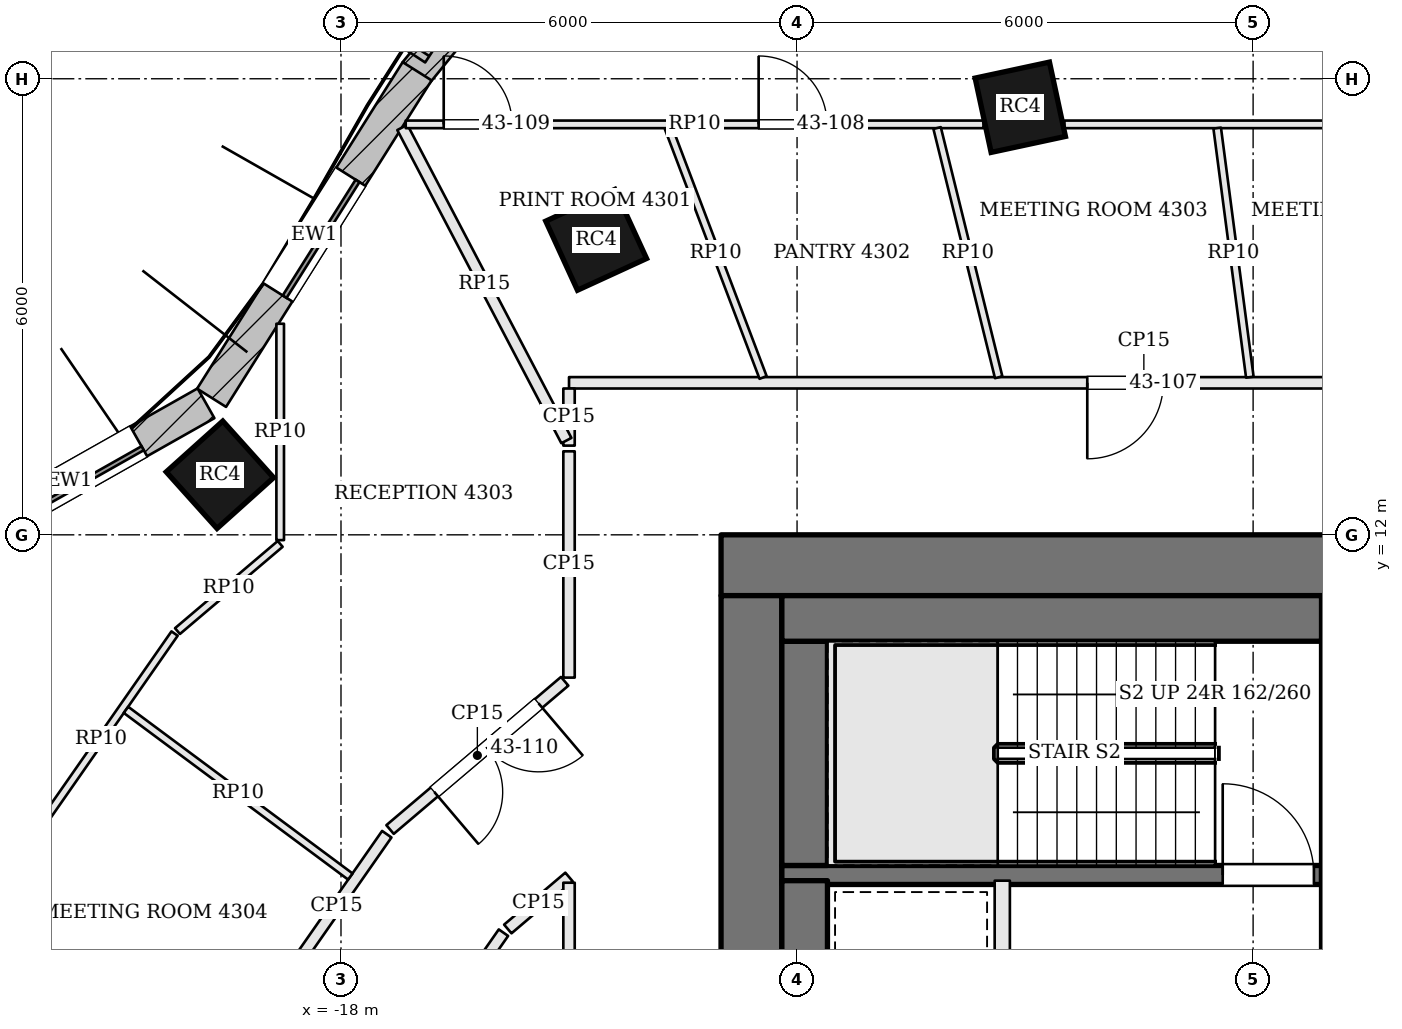
"""IFC4 building model, lengths in metres.
Left out: names, types, materials, properties, quantities, classifications, styles, units other than length and angle.
Written with IfcOpenShell. Run it as: python <this file> out.ifc"""

import sys

from ifc_helpers import new_model, si_unit, direction, frame, frame_2d, origin, origin_2d, place, context, subcontext, project, spatial, rectangle, extrude, element, fill, save


model = new_model("IFC4")
c1 = context("Model", 3, precision=1e-05, world=origin(), true_north=direction((0.0, 1.0)))
c2 = subcontext(c1, "Body", "Model", "MODEL_VIEW")
j1 = project(units=[si_unit("LENGTHUNIT", "METRE"), si_unit("PLANEANGLEUNIT", "RADIAN")], contexts=[c1])
p1 = place(None, origin())
s1 = spatial("IfcSite", under=j1, at=p1, CompositionType="ELEMENT")
p2 = place(p1, origin())
s2 = spatial("IfcBuilding", under=s1, at=p2, CompositionType="ELEMENT")
p3 = place(p2, frame((0.0, 0.0, 177.9)))
s3 = spatial("IfcBuildingStorey", under=s2, at=p3, CompositionType="ELEMENT", Elevation=177.9)
p4 = place(p3, frame((-13.0, 11.6, 0.0), z_axis=(0.0, 0.0, 1.0), x_axis=(1.0, 0.0, 0.0)))
e1 = element("IfcWall", 1, at=p4, inside=s3, PredefinedType="SHEAR", context=c2, shape_type="SweptSolid", body=[
    extrude(rectangle(XDim=26.0, YDim=0.8, at=frame_2d((13.0, 0.0))), origin(), (0.0, 0.0, 1.0), 3.9),
])
p5 = place(p4, frame((9.375, 0.0, 0.0)))
e2 = element("IfcOpeningElement", 2, at=p5, cuts=e1, PredefinedType="OPENING", context=c2, shape_type="SweptSolid", body=[
    extrude(rectangle(XDim=0.7, YDim=2.1, at=frame_2d((0.35, 1.05))), frame((0.0, 0.41, 0.0), z_axis=(0.0, -1.0, 0.0), x_axis=(1.0, 0.0, 0.0)), (0.0, 0.0, 1.0), 0.82),
])
p6 = place(p4, frame((12.075, 0.0, 0.0)))
e3 = element("IfcOpeningElement", 3, at=p6, cuts=e1, PredefinedType="OPENING", context=c2, shape_type="SweptSolid", body=[
    extrude(rectangle(XDim=1.0, YDim=2.1, at=frame_2d((0.5, 1.05))), frame((0.0, 0.41, 0.0), z_axis=(0.0, -1.0, 0.0), x_axis=(1.0, 0.0, 0.0)), (0.0, 0.0, 1.0), 0.82),
])
p7 = place(p4, frame((14.675, 0.0, 0.0)))
e4 = element("IfcOpeningElement", 4, at=p7, cuts=e1, PredefinedType="OPENING", context=c2, shape_type="SweptSolid", body=[
    extrude(rectangle(XDim=0.7, YDim=2.1, at=frame_2d((0.35, 1.05))), frame((0.0, 0.41, 0.0), z_axis=(0.0, -1.0, 0.0), x_axis=(1.0, 0.0, 0.0)), (0.0, 0.0, 1.0), 0.82),
])
p8 = place(p4, frame((16.625, 0.0, 0.0)))
e5 = element("IfcOpeningElement", 5, at=p8, cuts=e1, PredefinedType="OPENING", context=c2, shape_type="SweptSolid", body=[
    extrude(rectangle(XDim=0.9, YDim=2.1, at=frame_2d((0.45, 1.05))), frame((0.0, 0.41, 0.0), z_axis=(0.0, -1.0, 0.0), x_axis=(1.0, 0.0, 0.0)), (0.0, 0.0, 1.0), 0.82),
])
p9 = place(p3, frame((-12.6, -2.2, 0.0), z_axis=(0.0, 0.0, 1.0), x_axis=(0.0, 1.0, 0.0)))
e6 = element("IfcWall", 6, at=p9, inside=s3, PredefinedType="SHEAR", context=c2, shape_type="SweptSolid", body=[
    extrude(rectangle(XDim=13.4, YDim=0.8, at=frame_2d((6.7, 0.0))), origin(), (0.0, 0.0, 1.0), 3.9),
])
p10 = place(p9, frame((4.2, 0.0, 0.0)))
e7 = element("IfcOpeningElement", 7, at=p10, cuts=e6, PredefinedType="OPENING", context=c2, shape_type="SweptSolid", body=[
    extrude(rectangle(XDim=1.8, YDim=2.1, at=frame_2d((0.9, 1.05))), frame((0.0, 0.41, 0.0), z_axis=(0.0, -1.0, 0.0), x_axis=(1.0, 0.0, 0.0)), (0.0, 0.0, 1.0), 0.82),
])
for number, where, z_axis, x_axis in (
    (8, (-9.063, 17.625, 0.0), (0.0, 0.0, 1.0), (-0.978, -0.21, 0.0)),
    (9, (-14.643, 15.881, 0.0), (0.0, 0.0, 1.0), (-0.909, -0.417, 0.0)),
    (10, (-19.593, 12.79, 0.0), (0.0, 0.0, 1.0), (-0.744, -0.668, 0.0)),
):
    element("IfcColumn", number, at=place(p3, frame(where, z_axis=z_axis, x_axis=x_axis)), inside=s3, PredefinedType="COLUMN", context=c2, shape_type="SweptSolid", body=[
        extrude(rectangle(XDim=1.0, YDim=1.0, at=origin_2d()), origin(), (0.0, 0.0, 1.0), 3.9),
    ])
p11 = place(p3, frame((-14.926, 20.641, 0.0), z_axis=(0.0, 0.0, 1.0), x_axis=(-0.631548074669, -0.775336720001, 0.0)))
e11 = element("IfcWall", 11, at=p11, inside=s3, PredefinedType="SOLIDWALL", context=c2, shape_type="SweptSolid", body=[
    extrude(rectangle(XDim=3.308, YDim=0.45, at=frame_2d((1.654, 0.0))), origin(), (0.0, 0.0, 1.0), 3.7),
])
p12 = place(p11, frame((0.604, 0.0, 0.9)))
e12 = element("IfcOpeningElement", 12, at=p12, cuts=e11, PredefinedType="OPENING", context=c2, shape_type="SweptSolid", body=[
    extrude(rectangle(XDim=2.1, YDim=2.3, at=frame_2d((1.05, 1.15))), frame((0.0, 0.235, 0.0), z_axis=(0.0, -1.0, 0.0), x_axis=(1.0, 0.0, 0.0)), (0.0, 0.0, 1.0), 0.47),
])
p13 = place(p3, frame((-16.998, 18.099, 0.0), z_axis=(0.0, 0.0, 1.0), x_axis=(-0.532745661304, -0.846275404559, 0.0)))
e13 = element("IfcWall", 13, at=p13, inside=s3, PredefinedType="SOLIDWALL", context=c2, shape_type="SweptSolid", body=[
    extrude(rectangle(XDim=5.076, YDim=0.45, at=frame_2d((2.538, 0.0))), origin(), (0.0, 0.0, 1.0), 3.7),
])
p14 = place(p13, frame((1.638, 0.0, 0.9)))
e14 = element("IfcOpeningElement", 14, at=p14, cuts=e13, PredefinedType="OPENING", context=c2, shape_type="SweptSolid", body=[
    extrude(rectangle(XDim=1.8, YDim=2.3, at=frame_2d((0.9, 1.15))), frame((0.0, 0.235, 0.0), z_axis=(0.0, -1.0, 0.0), x_axis=(1.0, 0.0, 0.0)), (0.0, 0.0, 1.0), 0.47),
])
p15 = place(p3, frame((-19.776, 13.731, 0.0), z_axis=(0.0, 0.0, 1.0), x_axis=(-0.870610133829, -0.491973571318, 0.0)))
e15 = element("IfcWall", 15, at=p15, inside=s3, PredefinedType="SOLIDWALL", context=c2, shape_type="SweptSolid", body=[
    extrude(rectangle(XDim=4.134, YDim=0.45, at=frame_2d((2.067, 0.0))), origin(), (0.0, 0.0, 1.0), 3.7),
])
p16 = place(p15, frame((1.017, 0.0, 0.9)))
e16 = element("IfcOpeningElement", 16, at=p16, cuts=e15, PredefinedType="OPENING", context=c2, shape_type="SweptSolid", body=[
    extrude(rectangle(XDim=2.1, YDim=2.3, at=frame_2d((1.05, 1.15))), frame((0.0, 0.235, 0.0), z_axis=(0.0, -1.0, 0.0), x_axis=(1.0, 0.0, 0.0)), (0.0, 0.0, 1.0), 0.47),
])
p17 = place(p3, frame((-16.838, 18.298, 0.0), z_axis=(0.0, 0.0, 1.0), x_axis=(-0.835871900419, 0.548924554097, 0.0)))
e17 = element("IfcWall", 17, at=p17, inside=s3, PredefinedType="SOLIDWALL", context=c2, shape_type="SweptSolid", body=[
    extrude(rectangle(XDim=1.75, YDim=0.2, at=frame_2d((0.875, 0.0))), origin(), (0.0, 0.0, 1.0), 3.7),
])
p18 = place(p3, frame((-12.2, 7.525, 0.0), z_axis=(0.0, 0.0, 1.0), x_axis=(1.0, 0.0, 0.0)))
e18 = element("IfcWall", 18, at=p18, inside=s3, PredefinedType="SOLIDWALL", context=c2, shape_type="SweptSolid", body=[
    extrude(rectangle(XDim=7.1, YDim=0.25, at=frame_2d((3.55, 0.0))), origin(), (0.0, 0.0, 1.0), 3.7),
])
p19 = place(p18, frame((5.8, 0.0, 0.0)))
e19 = element("IfcOpeningElement", 19, at=p19, cuts=e18, PredefinedType="OPENING", context=c2, shape_type="SweptSolid", body=[
    extrude(rectangle(XDim=1.2, YDim=2.1, at=frame_2d((0.6, 1.05))), frame((0.0, 0.135, 0.0), z_axis=(0.0, -1.0, 0.0), x_axis=(1.0, 0.0, 0.0)), (0.0, 0.0, 1.0), 0.27),
])
p20 = place(p3, frame((-9.3, 4.45, 0.0), z_axis=(0.0, 0.0, 1.0), x_axis=(0.0, 1.0, 0.0)))
e20 = element("IfcWall", 20, at=p20, inside=s3, PredefinedType="SOLIDWALL", context=c2, shape_type="SweptSolid", body=[
    extrude(rectangle(XDim=3.0, YDim=0.2, at=frame_2d((1.5, 0.0))), origin(), (0.0, 0.0, 1.0), 3.7),
])
p21 = place(p3, frame((-4.975, -2.2, 0.0), z_axis=(0.0, 0.0, 1.0), x_axis=(0.0, 1.0, 0.0)))
e21 = element("IfcWall", 21, at=p21, inside=s3, PredefinedType="SOLIDWALL", context=c2, shape_type="SweptSolid", body=[
    extrude(rectangle(XDim=13.4, YDim=0.25, at=frame_2d((6.7, 0.0))), origin(), (0.0, 0.0, 1.0), 3.7),
])
p22 = place(p21, frame((5.25, 0.0, 0.0)))
e22 = element("IfcOpeningElement", 22, at=p22, cuts=e21, PredefinedType="OPENING", context=c2, shape_type="SweptSolid", body=[
    extrude(rectangle(XDim=1.2, YDim=2.1, at=frame_2d((0.6, 1.05))), frame((0.0, 0.135, 0.0), z_axis=(0.0, -1.0, 0.0), x_axis=(1.0, 0.0, 0.0)), (0.0, 0.0, 1.0), 0.27),
])
p23 = place(p3, frame((-11.9, 4.45, 0.0), z_axis=(0.0, 0.0, 1.0), x_axis=(0.0, 1.0, 0.0)))
e23 = element("IfcWall", 23, at=p23, inside=s3, PredefinedType="SOLIDWALL", context=c2, shape_type="SweptSolid", body=[
    extrude(rectangle(XDim=3.0, YDim=0.6, at=frame_2d((1.5, 0.0))), origin(), (0.0, 0.0, 1.0), 3.7),
])
p24 = place(p3, frame((-11.9, 7.65, 0.0), z_axis=(0.0, 0.0, 1.0), x_axis=(0.0, 1.0, 0.0)))
e24 = element("IfcWall", 24, at=p24, inside=s3, PredefinedType="SOLIDWALL", context=c2, shape_type="SweptSolid", body=[
    extrude(rectangle(XDim=2.95, YDim=0.6, at=frame_2d((1.475, 0.0))), origin(), (0.0, 0.0, 1.0), 3.7),
])
p25 = place(p3, frame((-12.2, 10.9, 0.0), z_axis=(0.0, 0.0, 1.0), x_axis=(1.0, 0.0, 0.0)))
e25 = element("IfcWall", 25, at=p25, inside=s3, PredefinedType="SOLIDWALL", context=c2, shape_type="SweptSolid", body=[
    extrude(rectangle(XDim=7.1, YDim=0.6, at=frame_2d((3.55, 0.0))), origin(), (0.0, 0.0, 1.0), 3.7),
])
p26 = place(p3, frame((0.125, 14.0, 0.0), z_axis=(0.0, 0.0, 1.0), x_axis=(-1.0, 0.0, 0.0)))
e26 = element("IfcWall", 26, at=p26, inside=s3, PredefinedType="PARTITIONING", context=c2, shape_type="SweptSolid", body=[
    extrude(rectangle(XDim=15.125, YDim=0.15, at=frame_2d((7.562, 0.0))), origin(), (0.0, 0.0, 1.0), 3.084),
])
p27 = place(p26, frame((0.888, 0.0, 0.0)))
e27 = element("IfcOpeningElement", 27, at=p27, cuts=e26, PredefinedType="OPENING", context=c2, shape_type="SweptSolid", body=[
    extrude(rectangle(XDim=1.0, YDim=2.1, at=frame_2d((0.5, 1.05))), frame((0.0, 0.085, 0.0), z_axis=(0.0, -1.0, 0.0), x_axis=(1.0, 0.0, 0.0)), (0.0, 0.0, 1.0), 0.17),
])
p28 = place(p26, frame((4.005, 0.0, 0.0)))
e28 = element("IfcOpeningElement", 28, at=p28, cuts=e26, PredefinedType="OPENING", context=c2, shape_type="SweptSolid", body=[
    extrude(rectangle(XDim=1.0, YDim=2.4, at=frame_2d((0.5, 1.2))), frame((0.0, 0.085, 0.0), z_axis=(0.0, -1.0, 0.0), x_axis=(1.0, 0.0, 0.0)), (0.0, 0.0, 1.0), 0.17),
])
p29 = place(p26, frame((7.307, 0.0, 0.0)))
e29 = element("IfcOpeningElement", 29, at=p29, cuts=e26, PredefinedType="OPENING", context=c2, shape_type="SweptSolid", body=[
    extrude(rectangle(XDim=1.0, YDim=2.4, at=frame_2d((0.5, 1.2))), frame((0.0, 0.085, 0.0), z_axis=(0.0, -1.0, 0.0), x_axis=(1.0, 0.0, 0.0)), (0.0, 0.0, 1.0), 0.17),
])
p30 = place(p3, frame((-15.0, 13.925, 0.0), z_axis=(0.0, 0.0, 1.0), x_axis=(0.0, -1.0, 0.0)))
e30 = element("IfcWall", 30, at=p30, inside=s3, PredefinedType="PARTITIONING", context=c2, shape_type="SweptSolid", body=[
    extrude(rectangle(XDim=0.751, YDim=0.15, at=frame_2d((0.376, 0.0))), origin(), (0.0, 0.0, 1.0), 3.084),
])
p31 = place(p3, frame((-17.193, 17.36, 0.0), z_axis=(0.0, 0.0, 1.0), x_axis=(0.463995225493, -0.885837699988, 0.0)))
e31 = element("IfcWall", 31, at=p31, inside=s3, PredefinedType="PARTITIONING", context=c2, shape_type="SweptSolid", body=[
    extrude(rectangle(XDim=4.651, YDim=0.15, at=frame_2d((2.325, 0.0))), origin(), (0.0, 0.0, 1.0), 3.234),
])
p32 = place(p3, frame((-15.0, 13.099, 0.0), z_axis=(0.0, 0.0, 1.0), x_axis=(0.0, -1.0, 0.0)))
e32 = element("IfcWall", 32, at=p32, inside=s3, PredefinedType="PARTITIONING", context=c2, shape_type="SweptSolid", body=[
    extrude(rectangle(XDim=2.977, YDim=0.15, at=frame_2d((1.489, 0.0))), origin(), (0.0, 0.0, 1.0), 3.084),
])
p33 = place(p3, frame((-15.057, 10.073, 0.0), z_axis=(0.0, 0.0, 1.0), x_axis=(-0.762398905861, -0.647107339119, 0.0)))
e33 = element("IfcWall", 33, at=p33, inside=s3, PredefinedType="PARTITIONING", context=c2, shape_type="SweptSolid", body=[
    extrude(rectangle(XDim=3.013, YDim=0.15, at=frame_2d((1.507, 0.0))), origin(), (0.0, 0.0, 1.0), 3.084),
])
p34 = place(p33, frame((0.45, 0.0, 0.0)))
e34 = element("IfcOpeningElement", 34, at=p34, cuts=e33, PredefinedType="OPENING", context=c2, shape_type="SweptSolid", body=[
    extrude(rectangle(XDim=1.8, YDim=2.1, at=frame_2d((0.9, 1.05))), frame((0.0, 0.085, 0.0), z_axis=(0.0, -1.0, 0.0), x_axis=(1.0, 0.0, 0.0)), (0.0, 0.0, 1.0), 0.17),
])
p35 = place(p3, frame((-17.397, 8.062, 0.0), z_axis=(0.0, 0.0, 1.0), x_axis=(-0.572118665737, -0.820170855563, 0.0)))
e35 = element("IfcWall", 35, at=p35, inside=s3, PredefinedType="PARTITIONING", context=c2, shape_type="SweptSolid", body=[
    extrude(rectangle(XDim=2.306, YDim=0.15, at=frame_2d((1.153, 0.0))), origin(), (0.0, 0.0, 1.0), 3.084),
])
p36 = place(p3, frame((-16.865, 5.329, 0.0), z_axis=(0.0, 0.0, 1.0), x_axis=(0.572096615639, 0.820186236397, 0.0)))
e36 = element("IfcWall", 36, at=p36, inside=s3, PredefinedType="PARTITIONING", context=c2, shape_type="SweptSolid", body=[
    extrude(rectangle(XDim=1.753, YDim=0.15, at=frame_2d((0.876, 0.0))), origin(), (0.0, 0.0, 1.0), 3.084),
])
p37 = place(p3, frame((-15.805, 6.814, 0.0), z_axis=(0.0, 0.0, 1.0), x_axis=(0.762298381233, 0.647225755027, 0.0)))
e37 = element("IfcWall", 37, at=p37, inside=s3, PredefinedType="PARTITIONING", context=c2, shape_type="SweptSolid", body=[
    extrude(rectangle(XDim=1.057, YDim=0.15, at=frame_2d((0.528, 0.0))), origin(), (0.0, 0.0, 1.0), 3.084),
])
p38 = place(p3, frame((-15.0, 7.423, 0.0), z_axis=(0.0, 0.0, 1.0), x_axis=(0.0, -1.0, 0.0)))
e38 = element("IfcWall", 38, at=p38, inside=s3, PredefinedType="PARTITIONING", context=c2, shape_type="SweptSolid", body=[
    extrude(rectangle(XDim=12.423, YDim=0.15, at=frame_2d((6.211, 0.0))), origin(), (0.0, 0.0, 1.0), 3.084),
])
p39 = place(p38, frame((5.174, 0.0, 0.0)))
e39 = element("IfcOpeningElement", 39, at=p39, cuts=e38, PredefinedType="OPENING", context=c2, shape_type="SweptSolid", body=[
    extrude(rectangle(XDim=1.0, YDim=2.1, at=frame_2d((0.5, 1.05))), frame((0.0, 0.085, 0.0), z_axis=(0.0, -1.0, 0.0), x_axis=(1.0, 0.0, 0.0)), (0.0, 0.0, 1.0), 0.17),
])
p40 = place(p3, frame((-17.149, 17.4, 0.0), z_axis=(0.0, 0.0, 1.0), x_axis=(1.0, 0.0, 0.0)))
e40 = element("IfcWall", 40, at=p40, inside=s3, PredefinedType="PARTITIONING", context=c2, shape_type="SweptSolid", body=[
    extrude(rectangle(XDim=7.602, YDim=0.1, at=frame_2d((3.801, 0.0))), origin(), (0.0, 0.0, 1.0), 3.084),
])
p41 = place(p40, frame((4.643, 0.0, 0.0)))
e41 = element("IfcOpeningElement", 41, at=p41, cuts=e40, PredefinedType="OPENING", context=c2, shape_type="SweptSolid", body=[
    extrude(rectangle(XDim=0.9, YDim=2.1, at=frame_2d((0.45, 1.05))), frame((0.0, 0.06, 0.0), z_axis=(0.0, -1.0, 0.0), x_axis=(1.0, 0.0, 0.0)), (0.0, 0.0, 1.0), 0.12),
])
p42 = place(p40, frame((0.5, 0.0, 0.0)))
e42 = element("IfcOpeningElement", 42, at=p42, cuts=e40, PredefinedType="OPENING", context=c2, shape_type="SweptSolid", body=[
    extrude(rectangle(XDim=0.9, YDim=2.1, at=frame_2d((0.45, 1.05))), frame((0.0, 0.06, 0.0), z_axis=(0.0, -1.0, 0.0), x_axis=(1.0, 0.0, 0.0)), (0.0, 0.0, 1.0), 0.12),
])
p43 = place(p3, frame((-8.483, 17.4, 0.0), z_axis=(0.0, 0.0, 1.0), x_axis=(1.0, 0.0, 0.0)))
e43 = element("IfcWall", 43, at=p43, inside=s3, PredefinedType="PARTITIONING", context=c2, shape_type="SweptSolid", body=[
    extrude(rectangle(XDim=8.671, YDim=0.1, at=frame_2d((4.335, 0.0))), origin(), (0.0, 0.0, 1.0), 3.084),
])
p44 = place(p43, frame((6.582, 0.0, 0.0)))
e44 = element("IfcOpeningElement", 44, at=p44, cuts=e43, PredefinedType="OPENING", context=c2, shape_type="SweptSolid", body=[
    extrude(rectangle(XDim=1.0, YDim=2.1, at=frame_2d((0.5, 1.05))), frame((0.0, 0.06, 0.0), z_axis=(0.0, -1.0, 0.0), x_axis=(1.0, 0.0, 0.0)), (0.0, 0.0, 1.0), 0.12),
])
p45 = place(p3, frame((-6.043, 14.074, 0.0), z_axis=(0.0, 0.0, 1.0), x_axis=(-0.12990779889, 0.991526078219, 0.0)))
e45 = element("IfcWall", 45, at=p45, inside=s3, PredefinedType="PARTITIONING", context=c2, shape_type="SweptSolid", body=[
    extrude(rectangle(XDim=3.304, YDim=0.1, at=frame_2d((1.652, 0.0))), origin(), (0.0, 0.0, 1.0), 3.084),
])
p46 = place(p3, frame((-9.347, 14.073, 0.0), z_axis=(0.0, 0.0, 1.0), x_axis=(-0.239847329474, 0.970810619299, 0.0)))
e46 = element("IfcWall", 46, at=p46, inside=s3, PredefinedType="PARTITIONING", context=c2, shape_type="SweptSolid", body=[
    extrude(rectangle(XDim=3.377, YDim=0.1, at=frame_2d((1.689, 0.0))), origin(), (0.0, 0.0, 1.0), 3.084),
])
p47 = place(p3, frame((-12.447, 14.07, 0.0), z_axis=(0.0, 0.0, 1.0), x_axis=(-0.354534757725, 0.935042836219, 0.0)))
e47 = element("IfcWall", 47, at=p47, inside=s3, PredefinedType="PARTITIONING", context=c2, shape_type="SweptSolid", body=[
    extrude(rectangle(XDim=3.511, YDim=0.1, at=frame_2d((1.756, 0.0))), origin(), (0.0, 0.0, 1.0), 3.084),
])
p48 = place(p3, frame((-22.125, 7.927, 0.0), z_axis=(0.0, 0.0, 1.0), x_axis=(0.572100301866, 0.820183665166, 0.0)))
e48 = element("IfcWall", 48, at=p48, inside=s3, PredefinedType="PARTITIONING", context=c2, shape_type="SweptSolid", body=[
    extrude(rectangle(XDim=3.382, YDim=0.1, at=frame_2d((1.691, 0.0))), origin(), (0.0, 0.0, 1.0), 3.084),
])
p49 = place(p3, frame((-20.151, 10.734, 0.0), z_axis=(0.0, 0.0, 1.0), x_axis=(0.762465888028, 0.647028414827, 0.0)))
e49 = element("IfcWall", 49, at=p49, inside=s3, PredefinedType="PARTITIONING", context=c2, shape_type="SweptSolid", body=[
    extrude(rectangle(XDim=1.772, YDim=0.1, at=frame_2d((0.886, 0.0))), origin(), (0.0, 0.0, 1.0), 3.084),
])
p50 = place(p3, frame((-18.8, 11.93, 0.0), z_axis=(0.0, 0.0, 1.0), x_axis=(0.0, 1.0, 0.0)))
e50 = element("IfcWall", 50, at=p50, inside=s3, PredefinedType="PARTITIONING", context=c2, shape_type="SweptSolid", body=[
    extrude(rectangle(XDim=2.846, YDim=0.1, at=frame_2d((1.423, 0.0))), origin(), (0.0, 0.0, 1.0), 3.084),
])
p51 = place(p3, frame((-17.877, 7.505, 0.0), z_axis=(0.0, 0.0, 1.0), x_axis=(-0.802692989486, 0.596392458563, 0.0)))
e51 = element("IfcWall", 51, at=p51, inside=s3, PredefinedType="PARTITIONING", context=c2, shape_type="SweptSolid", body=[
    extrude(rectangle(XDim=3.677, YDim=0.1, at=frame_2d((1.838, 0.0))), origin(), (0.0, 0.0, 1.0), 3.084),
])
p52 = place(p14, origin())
e52 = element("IfcWindow", 52, at=p52, inside=s3, PartitioningType="SINGLE_PANEL", PredefinedType="WINDOW", context=c2, shape_type="SweptSolid", body=[
    extrude(rectangle(XDim=1.8, YDim=2.3, at=frame_2d((0.9, 1.15))), frame((0.0, 0.135, 0.0), z_axis=(0.0, -1.0, 0.0), x_axis=(1.0, 0.0, 0.0)), (0.0, 0.0, 1.0), 0.06),
])
fill(e14, e52)
p53 = place(p16, origin())
e53 = element("IfcWindow", 53, at=p53, inside=s3, PartitioningType="SINGLE_PANEL", PredefinedType="WINDOW", context=c2, shape_type="SweptSolid", body=[
    extrude(rectangle(XDim=2.1, YDim=2.3, at=frame_2d((1.05, 1.15))), frame((0.0, 0.135, 0.0), z_axis=(0.0, -1.0, 0.0), x_axis=(1.0, 0.0, 0.0)), (0.0, 0.0, 1.0), 0.06),
])
fill(e16, e53)
p54 = place(p19, origin())
e54 = element("IfcDoor", 54, at=p54, inside=s3, OperationType="SINGLE_SWING_LEFT", PredefinedType="DOOR", context=c2, shape_type="SweptSolid", body=[
    extrude(rectangle(XDim=1.2, YDim=2.1, at=frame_2d((0.6, 1.05))), frame((0.0, 0.025, 0.0), z_axis=(0.0, -1.0, 0.0), x_axis=(1.0, 0.0, 0.0)), (0.0, 0.0, 1.0), 0.05),
])
fill(e19, e54)
p55 = place(p29, origin())
e55 = element("IfcDoor", 55, at=p55, inside=s3, OperationType="SINGLE_SWING_RIGHT", PredefinedType="DOOR", context=c2, shape_type="SweptSolid", body=[
    extrude(rectangle(XDim=1.0, YDim=2.4, at=frame_2d((0.5, 1.2))), frame((0.0, 0.025, 0.0), z_axis=(0.0, -1.0, 0.0), x_axis=(1.0, 0.0, 0.0)), (0.0, 0.0, 1.0), 0.05),
])
fill(e29, e55)
p56 = place(p41, origin())
e56 = element("IfcDoor", 56, at=p56, inside=s3, OperationType="SINGLE_SWING_LEFT", PredefinedType="DOOR", context=c2, shape_type="SweptSolid", body=[
    extrude(rectangle(XDim=0.9, YDim=2.1, at=frame_2d((0.45, 1.05))), frame((0.0, 0.025, 0.0), z_axis=(0.0, -1.0, 0.0), x_axis=(1.0, 0.0, 0.0)), (0.0, 0.0, 1.0), 0.05),
])
fill(e41, e56)
p57 = place(p42, origin())
e57 = element("IfcDoor", 57, at=p57, inside=s3, OperationType="SINGLE_SWING_LEFT", PredefinedType="DOOR", context=c2, shape_type="SweptSolid", body=[
    extrude(rectangle(XDim=0.9, YDim=2.1, at=frame_2d((0.45, 1.05))), frame((0.0, 0.025, 0.0), z_axis=(0.0, -1.0, 0.0), x_axis=(1.0, 0.0, 0.0)), (0.0, 0.0, 1.0), 0.05),
])
fill(e42, e57)
p58 = place(p34, origin())
e58 = element("IfcDoor", 58, at=p58, inside=s3, OperationType="DOUBLE_DOOR_SINGLE_SWING", PredefinedType="DOOR", context=c2, shape_type="SweptSolid", body=[
    extrude(rectangle(XDim=1.8, YDim=2.1, at=frame_2d((0.9, 1.05))), frame((0.0, 0.025, 0.0), z_axis=(0.0, -1.0, 0.0), x_axis=(1.0, 0.0, 0.0)), (0.0, 0.0, 1.0), 0.05),
])
fill(e34, e58)
save(model, sys.argv[1])
